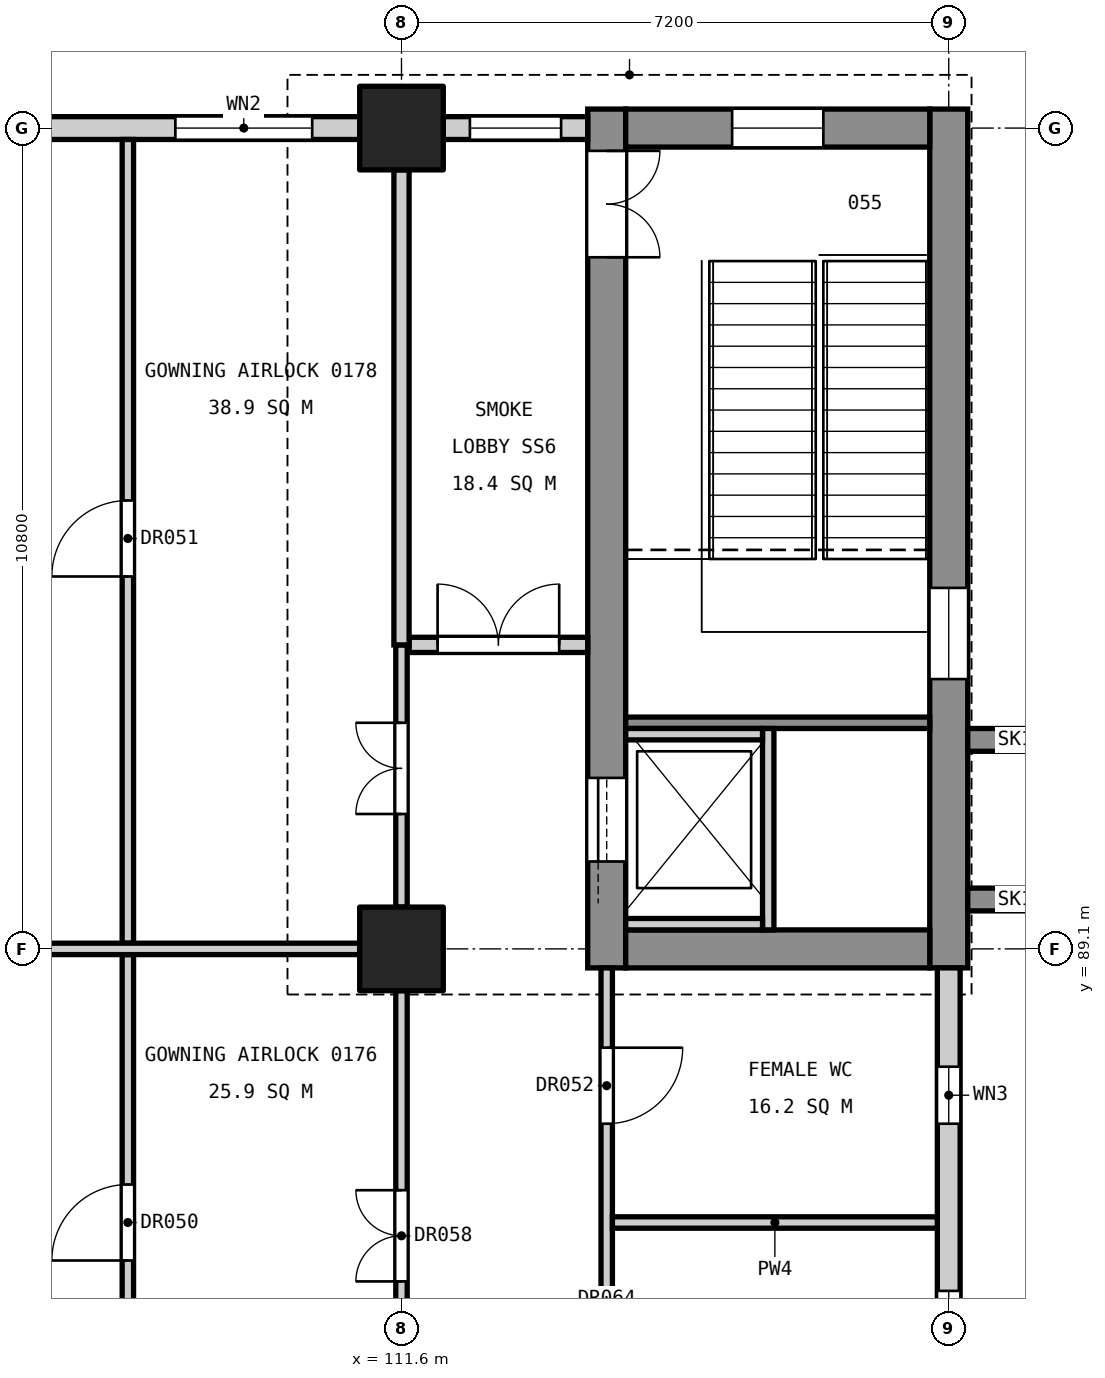
"""IFC4 building model, lengths in metres.
Left out: names, types, materials, properties, quantities, classifications, styles, units other than length and angle.
Written with IfcOpenShell. Run it as: python <this file> out.ifc"""

import sys

from ifc_helpers import new_model, si_unit, direction, frame, frame_2d, origin, origin_2d, place, context, subcontext, project, spatial, rectangle, extrude, element, fill, save


model = new_model("IFC4")
c1 = context("Model", 3, precision=1e-05, world=origin(), true_north=direction((0.0, 1.0)))
c2 = subcontext(c1, "Body", "Model", "MODEL_VIEW")
j1 = project(units=[si_unit("LENGTHUNIT", "METRE"), si_unit("PLANEANGLEUNIT", "RADIAN")], contexts=[c1])
p1 = place(None, origin())
s1 = spatial("IfcSite", under=j1, at=p1, CompositionType="ELEMENT")
p2 = place(p1, origin())
s2 = spatial("IfcBuilding", under=s1, at=p2, CompositionType="ELEMENT")
p3 = place(p2, frame((0.0, 0.0, 6.0)))
s3 = spatial("IfcBuildingStorey", under=s2, at=p3, CompositionType="ELEMENT", Elevation=6.0)
for number, where, z_axis, x_axis in (
    (1, (111.6, 89.1, 0.0), (0.0, 0.0, 1.0), (1.0, 0.0, 0.0)),
    (2, (111.6, 99.9, 0.0), (0.0, 0.0, 1.0), (1.0, 0.0, 0.0)),
):
    element("IfcColumn", number, at=place(p3, frame(where, z_axis=z_axis, x_axis=x_axis)), inside=s3, PredefinedType="COLUMN", context=c2, shape_type="SweptSolid", body=[
        extrude(rectangle(XDim=1.1, YDim=1.1, at=origin_2d()), origin(), (0.0, 0.0, 1.0), 5.4),
    ])
p4 = place(p3, frame((118.8, 88.85, 0.0), z_axis=(0.0, 0.0, 1.0), x_axis=(0.0, 1.0, 0.0)))
e3 = element("IfcWall", 3, at=p4, inside=s3, PredefinedType="SHEAR", context=c2, shape_type="SweptSolid", body=[
    extrude(rectangle(XDim=11.3, YDim=0.5, at=frame_2d((5.65, 0.0))), origin(), (0.0, 0.0, 1.0), 5.1),
])
p5 = place(p4, frame((3.8, 0.0, 3.4)))
e4 = element("IfcOpeningElement", 4, at=p5, cuts=e3, PredefinedType="OPENING", context=c2, shape_type="SweptSolid", body=[
    extrude(rectangle(XDim=1.2, YDim=0.9, at=frame_2d((0.6, 0.45))), frame((0.0, 0.26, 0.0), z_axis=(0.0, -1.0, 0.0), x_axis=(1.0, 0.0, 0.0)), (0.0, 0.0, 1.0), 0.52),
])
p6 = place(p3, frame((114.3, 88.85, 0.0), z_axis=(0.0, 0.0, 1.0), x_axis=(0.0, 1.0, 0.0)))
e5 = element("IfcWall", 5, at=p6, inside=s3, PredefinedType="SHEAR", context=c2, shape_type="SweptSolid", body=[
    extrude(rectangle(XDim=11.3, YDim=0.5, at=frame_2d((5.65, 0.0))), origin(), (0.0, 0.0, 1.0), 5.1),
])
p7 = place(p6, frame((9.35, 0.0, 0.0)))
e6 = element("IfcOpeningElement", 6, at=p7, cuts=e5, PredefinedType="OPENING", context=c2, shape_type="SweptSolid", body=[
    extrude(rectangle(XDim=1.4, YDim=2.1, at=frame_2d((0.7, 1.05))), frame((0.0, 0.26, 0.0), z_axis=(0.0, -1.0, 0.0), x_axis=(1.0, 0.0, 0.0)), (0.0, 0.0, 1.0), 0.52),
])
p8 = place(p6, frame((1.4, 0.0, 0.0)))
e7 = element("IfcOpeningElement", 7, at=p8, cuts=e5, PredefinedType="OPENING", context=c2, shape_type="SweptSolid", body=[
    extrude(rectangle(XDim=1.1, YDim=2.1, at=frame_2d((0.55, 1.05))), frame((0.0, 0.26, 0.0), z_axis=(0.0, -1.0, 0.0), x_axis=(1.0, 0.0, 0.0)), (0.0, 0.0, 1.0), 0.52),
])
p9 = place(p3, frame((118.55, 89.1, 0.0), z_axis=(0.0, 0.0, 1.0), x_axis=(-1.0, 0.0, 0.0)))
e8 = element("IfcWall", 8, at=p9, inside=s3, PredefinedType="SHEAR", context=c2, shape_type="SweptSolid", body=[
    extrude(rectangle(XDim=4.0, YDim=0.5, at=frame_2d((2.0, 0.0))), origin(), (0.0, 0.0, 1.0), 5.1),
])
p10 = place(p3, frame((118.55, 99.9, 0.0), z_axis=(0.0, 0.0, 1.0), x_axis=(-1.0, 0.0, 0.0)))
e9 = element("IfcWall", 9, at=p10, inside=s3, PredefinedType="SHEAR", context=c2, shape_type="SweptSolid", body=[
    extrude(rectangle(XDim=4.0, YDim=0.5, at=frame_2d((2.0, 0.0))), origin(), (0.0, 0.0, 1.0), 5.1),
])
p11 = place(p10, frame((1.4, 0.0, 3.4)))
e10 = element("IfcOpeningElement", 10, at=p11, cuts=e9, PredefinedType="OPENING", context=c2, shape_type="SweptSolid", body=[
    extrude(rectangle(XDim=1.2, YDim=0.9, at=frame_2d((0.6, 0.45))), frame((0.0, 0.26, 0.0), z_axis=(0.0, -1.0, 0.0), x_axis=(1.0, 0.0, 0.0)), (0.0, 0.0, 1.0), 0.52),
])
for number, where, z_axis, x_axis in (
    (11, (119.05, 89.75, 0.0), (0.0, 0.0, 1.0), (1.0, 0.0, 0.0)),
    (12, (119.05, 91.85, 0.0), (0.0, 0.0, 1.0), (1.0, 0.0, 0.0)),
):
    element("IfcWall", number, at=place(p3, frame(where, z_axis=z_axis, x_axis=x_axis)), inside=s3, PredefinedType="SHEAR", context=c2, shape_type="SweptSolid", body=[
        extrude(rectangle(XDim=1.25, YDim=0.3, at=frame_2d((0.625, 0.0))), origin(), (0.0, 0.0, 1.0), 5.4),
    ])
p12 = place(p3, frame((118.55, 92.075, 0.0), z_axis=(0.0, 0.0, 1.0), x_axis=(-1.0, 0.0, 0.0)))
e13 = element("IfcWall", 13, at=p12, inside=s3, PredefinedType="SOLIDWALL", context=c2, shape_type="SweptSolid", body=[
    extrude(rectangle(XDim=4.0, YDim=0.15, at=frame_2d((2.0, 0.0))), origin(), (0.0, 0.0, 1.0), 5.1),
])
p13 = place(p3, frame((116.425, 92.0, 0.0), z_axis=(0.0, 0.0, 1.0), x_axis=(0.0, -1.0, 0.0)))
e14 = element("IfcWall", 14, at=p13, inside=s3, PredefinedType="SOLIDWALL", context=c2, shape_type="SweptSolid", body=[
    extrude(rectangle(XDim=2.65, YDim=0.15, at=frame_2d((1.325, 0.0))), origin(), (0.0, 0.0, 1.0), 5.4),
])
for number, where, z_axis, x_axis in (
    (15, (116.35, 91.925, 0.0), (0.0, 0.0, 1.0), (-1.0, 0.0, 0.0)),
    (16, (116.35, 89.425, 0.0), (0.0, 0.0, 1.0), (-1.0, 0.0, 0.0)),
):
    element("IfcWall", number, at=place(p3, frame(where, z_axis=z_axis, x_axis=x_axis)), inside=s3, PredefinedType="SOLIDWALL", context=c2, shape_type="SweptSolid", body=[
        extrude(rectangle(XDim=1.8, YDim=0.15, at=frame_2d((0.9, 0.0))), origin(), (0.0, 0.0, 1.0), 5.4),
    ])
p14 = place(p3, frame((118.8, 78.85, 0.0), z_axis=(0.0, 0.0, 1.0), x_axis=(0.0, 1.0, 0.0)))
e17 = element("IfcWall", 17, at=p14, inside=s3, PredefinedType="STANDARD", context=c2, shape_type="SweptSolid", body=[
    extrude(rectangle(XDim=10.0, YDim=0.3, at=frame_2d((5.0, 0.0))), origin(), (0.0, 0.0, 1.0), 4.1),
])
p15 = place(p14, frame((0.625, 0.0, 0.9)))
e18 = element("IfcOpeningElement", 18, at=p15, cuts=e17, PredefinedType="OPENING", context=c2, shape_type="SweptSolid", body=[
    extrude(rectangle(XDim=1.8, YDim=3.0, at=frame_2d((0.9, 1.5))), frame((0.0, 0.16, 0.0), z_axis=(0.0, -1.0, 0.0), x_axis=(1.0, 0.0, 0.0)), (0.0, 0.0, 1.0), 0.32),
])
p16 = place(p14, frame((3.95, 0.0, 0.9)))
e19 = element("IfcOpeningElement", 19, at=p16, cuts=e17, PredefinedType="OPENING", context=c2, shape_type="SweptSolid", body=[
    extrude(rectangle(XDim=1.8, YDim=3.0, at=frame_2d((0.9, 1.5))), frame((0.0, 0.16, 0.0), z_axis=(0.0, -1.0, 0.0), x_axis=(1.0, 0.0, 0.0)), (0.0, 0.0, 1.0), 0.32),
])
p17 = place(p14, frame((7.95, 0.0, 0.8)))
e20 = element("IfcOpeningElement", 20, at=p17, cuts=e17, PredefinedType="OPENING", context=c2, shape_type="SweptSolid", body=[
    extrude(rectangle(XDim=0.75, YDim=1.2, at=frame_2d((0.375, 0.6))), frame((0.0, 0.16, 0.0), z_axis=(0.0, -1.0, 0.0), x_axis=(1.0, 0.0, 0.0)), (0.0, 0.0, 1.0), 0.32),
])
p18 = place(p3, frame((114.05, 99.9, 0.0), z_axis=(0.0, 0.0, 1.0), x_axis=(-1.0, 0.0, 0.0)))
e21 = element("IfcWall", 21, at=p18, inside=s3, PredefinedType="STANDARD", context=c2, shape_type="SweptSolid", body=[
    extrude(rectangle(XDim=1.9, YDim=0.3, at=frame_2d((0.95, 0.0))), origin(), (0.0, 0.0, 1.0), 4.3),
])
p19 = place(p18, frame((0.35, 0.0, 0.9)))
e22 = element("IfcOpeningElement", 22, at=p19, cuts=e21, PredefinedType="OPENING", context=c2, shape_type="SweptSolid", body=[
    extrude(rectangle(XDim=1.2, YDim=2.4, at=frame_2d((0.6, 1.2))), frame((0.0, 0.16, 0.0), z_axis=(0.0, -1.0, 0.0), x_axis=(1.0, 0.0, 0.0)), (0.0, 0.0, 1.0), 0.32),
])
p20 = place(p3, frame((111.05, 99.9, 0.0), z_axis=(0.0, 0.0, 1.0), x_axis=(-1.0, 0.0, 0.0)))
e23 = element("IfcWall", 23, at=p20, inside=s3, PredefinedType="STANDARD", context=c2, shape_type="SweptSolid", body=[
    extrude(rectangle(XDim=9.7, YDim=0.3, at=frame_2d((4.85, 0.0))), origin(), (0.0, 0.0, 1.0), 4.3),
])
p21 = place(p20, frame((0.625, 0.0, 0.9)))
e24 = element("IfcOpeningElement", 24, at=p21, cuts=e23, PredefinedType="OPENING", context=c2, shape_type="SweptSolid", body=[
    extrude(rectangle(XDim=1.8, YDim=3.0, at=frame_2d((0.9, 1.5))), frame((0.0, 0.16, 0.0), z_axis=(0.0, -1.0, 0.0), x_axis=(1.0, 0.0, 0.0)), (0.0, 0.0, 1.0), 0.32),
])
p22 = place(p20, frame((4.475, 0.0, 0.8)))
e25 = element("IfcOpeningElement", 25, at=p22, cuts=e23, PredefinedType="OPENING", context=c2, shape_type="SweptSolid", body=[
    extrude(rectangle(XDim=0.75, YDim=1.2, at=frame_2d((0.375, 0.6))), frame((0.0, 0.16, 0.0), z_axis=(0.0, -1.0, 0.0), x_axis=(1.0, 0.0, 0.0)), (0.0, 0.0, 1.0), 0.32),
])
p23 = place(p20, frame((7.275, 0.0, 0.9)))
e26 = element("IfcOpeningElement", 26, at=p23, cuts=e23, PredefinedType="OPENING", context=c2, shape_type="SweptSolid", body=[
    extrude(rectangle(XDim=1.8, YDim=3.0, at=frame_2d((0.9, 1.5))), frame((0.0, 0.16, 0.0), z_axis=(0.0, -1.0, 0.0), x_axis=(1.0, 0.0, 0.0)), (0.0, 0.0, 1.0), 0.32),
])
p24 = place(p3, frame((114.3, 78.45, 0.0), z_axis=(0.0, 0.0, 1.0), x_axis=(0.0, 1.0, 0.0)))
e27 = element("IfcWall", 27, at=p24, inside=s3, PredefinedType="PARTITIONING", context=c2, shape_type="SweptSolid", body=[
    extrude(rectangle(XDim=10.4, YDim=0.15, at=frame_2d((5.2, 0.0))), origin(), (0.0, 0.0, 1.0), 4.0),
])
p25 = place(p24, frame((8.35, 0.0, 0.0)))
e28 = element("IfcOpeningElement", 28, at=p25, cuts=e27, PredefinedType="OPENING", context=c2, shape_type="SweptSolid", body=[
    extrude(rectangle(XDim=1.0, YDim=2.1, at=frame_2d((0.5, 1.05))), frame((0.0, 0.085, 0.0), z_axis=(0.0, -1.0, 0.0), x_axis=(1.0, 0.0, 0.0)), (0.0, 0.0, 1.0), 0.17),
])
p26 = place(p24, frame((1.15, 0.0, 0.0)))
e29 = element("IfcOpeningElement", 29, at=p26, cuts=e27, PredefinedType="OPENING", context=c2, shape_type="SweptSolid", body=[
    extrude(rectangle(XDim=1.0, YDim=2.1, at=frame_2d((0.5, 1.05))), frame((0.0, 0.085, 0.0), z_axis=(0.0, -1.0, 0.0), x_axis=(1.0, 0.0, 0.0)), (0.0, 0.0, 1.0), 0.17),
])
p27 = place(p24, frame((4.75, 0.0, 0.0)))
e30 = element("IfcOpeningElement", 30, at=p27, cuts=e27, PredefinedType="OPENING", context=c2, shape_type="SweptSolid", body=[
    extrude(rectangle(XDim=1.0, YDim=2.1, at=frame_2d((0.5, 1.05))), frame((0.0, 0.085, 0.0), z_axis=(0.0, -1.0, 0.0), x_axis=(1.0, 0.0, 0.0)), (0.0, 0.0, 1.0), 0.17),
])
p28 = place(p3, frame((118.65, 85.5, 0.0), z_axis=(0.0, 0.0, 1.0), x_axis=(-1.0, 0.0, 0.0)))
e31 = element("IfcWall", 31, at=p28, inside=s3, PredefinedType="PARTITIONING", context=c2, shape_type="SweptSolid", body=[
    extrude(rectangle(XDim=4.275, YDim=0.15, at=frame_2d((2.137, 0.0))), origin(), (0.0, 0.0, 1.0), 4.3),
])
p29 = place(p3, frame((114.05, 93.1, 0.0), z_axis=(0.0, 0.0, 1.0), x_axis=(-1.0, 0.0, 0.0)))
e32 = element("IfcWall", 32, at=p29, inside=s3, PredefinedType="PARTITIONING", context=c2, shape_type="SweptSolid", body=[
    extrude(rectangle(XDim=2.35, YDim=0.2, at=frame_2d((1.175, 0.0))), origin(), (0.0, 0.0, 1.0), 4.0),
])
p30 = place(p29, frame((0.375, 0.0, 0.0)))
e33 = element("IfcOpeningElement", 33, at=p30, cuts=e32, PredefinedType="OPENING", context=c2, shape_type="SweptSolid", body=[
    extrude(rectangle(XDim=1.6, YDim=2.1, at=frame_2d((0.8, 1.05))), frame((0.0, 0.11, 0.0), z_axis=(0.0, -1.0, 0.0), x_axis=(1.0, 0.0, 0.0)), (0.0, 0.0, 1.0), 0.22),
])
p31 = place(p3, frame((111.6, 78.85, 0.0), z_axis=(0.0, 0.0, 1.0), x_axis=(0.0, 1.0, 0.0)))
e34 = element("IfcWall", 34, at=p31, inside=s3, PredefinedType="PARTITIONING", context=c2, shape_type="SweptSolid", body=[
    extrude(rectangle(XDim=9.7, YDim=0.15, at=frame_2d((4.85, 0.0))), origin(), (0.0, 0.0, 1.0), 4.0),
])
p32 = place(p31, frame((1.025, 0.0, 0.0)))
e35 = element("IfcOpeningElement", 35, at=p32, cuts=e34, PredefinedType="OPENING", context=c2, shape_type="SweptSolid", body=[
    extrude(rectangle(XDim=1.2, YDim=2.1, at=frame_2d((0.6, 1.05))), frame((0.0, 0.085, 0.0), z_axis=(0.0, -1.0, 0.0), x_axis=(1.0, 0.0, 0.0)), (0.0, 0.0, 1.0), 0.17),
])
p33 = place(p31, frame((5.875, 0.0, 0.0)))
e36 = element("IfcOpeningElement", 36, at=p33, cuts=e34, PredefinedType="OPENING", context=c2, shape_type="SweptSolid", body=[
    extrude(rectangle(XDim=1.2, YDim=2.1, at=frame_2d((0.6, 1.05))), frame((0.0, 0.085, 0.0), z_axis=(0.0, -1.0, 0.0), x_axis=(1.0, 0.0, 0.0)), (0.0, 0.0, 1.0), 0.17),
])
p34 = place(p3, frame((111.6, 89.65, 0.0), z_axis=(0.0, 0.0, 1.0), x_axis=(0.0, 1.0, 0.0)))
e37 = element("IfcWall", 37, at=p34, inside=s3, PredefinedType="PARTITIONING", context=c2, shape_type="SweptSolid", body=[
    extrude(rectangle(XDim=3.45, YDim=0.15, at=frame_2d((1.725, 0.0))), origin(), (0.0, 0.0, 1.0), 4.0),
])
p35 = place(p34, frame((1.225, 0.0, 0.0)))
e38 = element("IfcOpeningElement", 38, at=p35, cuts=e37, PredefinedType="OPENING", context=c2, shape_type="SweptSolid", body=[
    extrude(rectangle(XDim=1.2, YDim=2.1, at=frame_2d((0.6, 1.05))), frame((0.0, 0.085, 0.0), z_axis=(0.0, -1.0, 0.0), x_axis=(1.0, 0.0, 0.0)), (0.0, 0.0, 1.0), 0.17),
])
p36 = place(p3, frame((111.6, 93.1, 0.0), z_axis=(0.0, 0.0, 1.0), x_axis=(0.0, 1.0, 0.0)))
e39 = element("IfcWall", 39, at=p36, inside=s3, PredefinedType="PARTITIONING", context=c2, shape_type="SweptSolid", body=[
    extrude(rectangle(XDim=6.25, YDim=0.2, at=frame_2d((3.125, 0.0))), origin(), (0.0, 0.0, 1.0), 4.0),
])
p37 = place(p3, frame((108.0, 81.975, 0.0), z_axis=(0.0, 0.0, 1.0), x_axis=(0.0, 1.0, 0.0)))
e40 = element("IfcWall", 40, at=p37, inside=s3, PredefinedType="PARTITIONING", context=c2, shape_type="SweptSolid", body=[
    extrude(rectangle(XDim=7.05, YDim=0.15, at=frame_2d((3.525, 0.0))), origin(), (0.0, 0.0, 1.0), 4.0),
])
p38 = place(p37, frame((3.025, 0.0, 0.0)))
e41 = element("IfcOpeningElement", 41, at=p38, cuts=e40, PredefinedType="OPENING", context=c2, shape_type="SweptSolid", body=[
    extrude(rectangle(XDim=1.0, YDim=2.1, at=frame_2d((0.5, 1.05))), frame((0.0, 0.085, 0.0), z_axis=(0.0, -1.0, 0.0), x_axis=(1.0, 0.0, 0.0)), (0.0, 0.0, 1.0), 0.17),
])
p39 = place(p3, frame((108.0, 89.175, 0.0), z_axis=(0.0, 0.0, 1.0), x_axis=(0.0, 1.0, 0.0)))
e42 = element("IfcWall", 42, at=p39, inside=s3, PredefinedType="PARTITIONING", context=c2, shape_type="SweptSolid", body=[
    extrude(rectangle(XDim=10.575, YDim=0.15, at=frame_2d((5.288, 0.0))), origin(), (0.0, 0.0, 1.0), 4.0),
])
p40 = place(p39, frame((4.825, 0.0, 0.0)))
e43 = element("IfcOpeningElement", 43, at=p40, cuts=e42, PredefinedType="OPENING", context=c2, shape_type="SweptSolid", body=[
    extrude(rectangle(XDim=1.0, YDim=2.1, at=frame_2d((0.5, 1.05))), frame((0.0, 0.085, 0.0), z_axis=(0.0, -1.0, 0.0), x_axis=(1.0, 0.0, 0.0)), (0.0, 0.0, 1.0), 0.17),
])
p41 = place(p3, frame((111.05, 89.1, 0.0), z_axis=(0.0, 0.0, 1.0), x_axis=(-1.0, 0.0, 0.0)))
e44 = element("IfcWall", 44, at=p41, inside=s3, PredefinedType="PARTITIONING", context=c2, shape_type="SweptSolid", body=[
    extrude(rectangle(XDim=9.7, YDim=0.15, at=frame_2d((4.85, 0.0))), origin(), (0.0, 0.0, 1.0), 4.3),
])
p42 = place(p7, frame((1.4, 0.0, 0.0), z_axis=(0.0, 0.0, 1.0), x_axis=(-1.0, 0.0, 0.0)))
e45 = element("IfcDoor", 45, at=p42, inside=s3, OperationType="DOUBLE_DOOR_SINGLE_SWING", PredefinedType="DOOR", context=c2, shape_type="SweptSolid", body=[
    extrude(rectangle(XDim=1.4, YDim=2.1, at=frame_2d((0.7, 1.05))), frame((0.0, 0.025, 0.0), z_axis=(0.0, -1.0, 0.0), x_axis=(1.0, 0.0, 0.0)), (0.0, 0.0, 1.0), 0.05),
])
fill(e6, e45)
p43 = place(p8, origin())
e46 = element("IfcDoor", 46, at=p43, inside=s3, OperationType="SLIDING_TO_LEFT", PredefinedType="DOOR", context=c2, shape_type="SweptSolid", body=[
    extrude(rectangle(XDim=1.1, YDim=2.1, at=frame_2d((0.55, 1.05))), frame((0.0, 0.025, 0.0), z_axis=(0.0, -1.0, 0.0), x_axis=(1.0, 0.0, 0.0)), (0.0, 0.0, 1.0), 0.05),
])
fill(e7, e46)
p44 = place(p16, origin())
e47 = element("IfcWindow", 47, at=p44, inside=s3, PartitioningType="SINGLE_PANEL", PredefinedType="WINDOW", context=c2, shape_type="SweptSolid", body=[
    extrude(rectangle(XDim=1.8, YDim=3.0, at=frame_2d((0.9, 1.5))), frame((0.0, 0.03, 0.0), z_axis=(0.0, -1.0, 0.0), x_axis=(1.0, 0.0, 0.0)), (0.0, 0.0, 1.0), 0.06),
])
fill(e19, e47)
p45 = place(p17, origin())
e48 = element("IfcWindow", 48, at=p45, inside=s3, PartitioningType="SINGLE_PANEL", PredefinedType="WINDOW", context=c2, shape_type="SweptSolid", body=[
    extrude(rectangle(XDim=0.75, YDim=1.2, at=frame_2d((0.375, 0.6))), frame((0.0, 0.03, 0.0), z_axis=(0.0, -1.0, 0.0), x_axis=(1.0, 0.0, 0.0)), (0.0, 0.0, 1.0), 0.06),
])
fill(e20, e48)
p46 = place(p19, origin())
e49 = element("IfcWindow", 49, at=p46, inside=s3, PartitioningType="SINGLE_PANEL", PredefinedType="WINDOW", context=c2, shape_type="SweptSolid", body=[
    extrude(rectangle(XDim=1.2, YDim=2.4, at=frame_2d((0.6, 1.2))), frame((0.0, 0.03, 0.0), z_axis=(0.0, -1.0, 0.0), x_axis=(1.0, 0.0, 0.0)), (0.0, 0.0, 1.0), 0.06),
])
fill(e22, e49)
p47 = place(p21, origin())
e50 = element("IfcWindow", 50, at=p47, inside=s3, PartitioningType="SINGLE_PANEL", PredefinedType="WINDOW", context=c2, shape_type="SweptSolid", body=[
    extrude(rectangle(XDim=1.8, YDim=3.0, at=frame_2d((0.9, 1.5))), frame((0.0, 0.03, 0.0), z_axis=(0.0, -1.0, 0.0), x_axis=(1.0, 0.0, 0.0)), (0.0, 0.0, 1.0), 0.06),
])
fill(e24, e50)
p48 = place(p5, origin())
e51 = element("IfcWindow", 51, at=p48, inside=s3, PartitioningType="SINGLE_PANEL", PredefinedType="WINDOW", context=c2, shape_type="SweptSolid", body=[
    extrude(rectangle(XDim=1.2, YDim=0.9, at=frame_2d((0.6, 0.45))), frame((0.0, 0.03, 0.0), z_axis=(0.0, -1.0, 0.0), x_axis=(1.0, 0.0, 0.0)), (0.0, 0.0, 1.0), 0.06),
])
fill(e4, e51)
p49 = place(p11, origin())
e52 = element("IfcWindow", 52, at=p49, inside=s3, PartitioningType="SINGLE_PANEL", PredefinedType="WINDOW", context=c2, shape_type="SweptSolid", body=[
    extrude(rectangle(XDim=1.2, YDim=0.9, at=frame_2d((0.6, 0.45))), frame((0.0, 0.03, 0.0), z_axis=(0.0, -1.0, 0.0), x_axis=(1.0, 0.0, 0.0)), (0.0, 0.0, 1.0), 0.06),
])
fill(e10, e52)
p50 = place(p38, origin())
e53 = element("IfcDoor", 53, at=p50, inside=s3, OperationType="SINGLE_SWING_LEFT", PredefinedType="DOOR", context=c2, shape_type="SweptSolid", body=[
    extrude(rectangle(XDim=1.0, YDim=2.1, at=frame_2d((0.5, 1.05))), frame((0.0, 0.025, 0.0), z_axis=(0.0, -1.0, 0.0), x_axis=(1.0, 0.0, 0.0)), (0.0, 0.0, 1.0), 0.05),
])
fill(e41, e53)
p51 = place(p40, origin())
e54 = element("IfcDoor", 54, at=p51, inside=s3, OperationType="SINGLE_SWING_LEFT", PredefinedType="DOOR", context=c2, shape_type="SweptSolid", body=[
    extrude(rectangle(XDim=1.0, YDim=2.1, at=frame_2d((0.5, 1.05))), frame((0.0, 0.025, 0.0), z_axis=(0.0, -1.0, 0.0), x_axis=(1.0, 0.0, 0.0)), (0.0, 0.0, 1.0), 0.05),
])
fill(e43, e54)
p52 = place(p25, frame((1.0, 0.0, 0.0), z_axis=(0.0, 0.0, 1.0), x_axis=(-1.0, 0.0, 0.0)))
e55 = element("IfcDoor", 55, at=p52, inside=s3, OperationType="SINGLE_SWING_LEFT", PredefinedType="DOOR", context=c2, shape_type="SweptSolid", body=[
    extrude(rectangle(XDim=1.0, YDim=2.1, at=frame_2d((0.5, 1.05))), frame((0.0, 0.025, 0.0), z_axis=(0.0, -1.0, 0.0), x_axis=(1.0, 0.0, 0.0)), (0.0, 0.0, 1.0), 0.05),
])
fill(e28, e55)
p53 = place(p33, origin())
e56 = element("IfcDoor", 56, at=p53, inside=s3, OperationType="DOUBLE_DOOR_SINGLE_SWING", PredefinedType="DOOR", context=c2, shape_type="SweptSolid", body=[
    extrude(rectangle(XDim=1.2, YDim=2.1, at=frame_2d((0.6, 1.05))), frame((0.0, 0.025, 0.0), z_axis=(0.0, -1.0, 0.0), x_axis=(1.0, 0.0, 0.0)), (0.0, 0.0, 1.0), 0.05),
])
fill(e36, e56)
p54 = place(p35, origin())
e57 = element("IfcDoor", 57, at=p54, inside=s3, OperationType="DOUBLE_DOOR_SINGLE_SWING", PredefinedType="DOOR", context=c2, shape_type="SweptSolid", body=[
    extrude(rectangle(XDim=1.2, YDim=2.1, at=frame_2d((0.6, 1.05))), frame((0.0, 0.025, 0.0), z_axis=(0.0, -1.0, 0.0), x_axis=(1.0, 0.0, 0.0)), (0.0, 0.0, 1.0), 0.05),
])
fill(e38, e57)
p55 = place(p30, frame((1.6, 0.0, 0.0), z_axis=(0.0, 0.0, 1.0), x_axis=(-1.0, 0.0, 0.0)))
e58 = element("IfcDoor", 58, at=p55, inside=s3, OperationType="DOUBLE_DOOR_SINGLE_SWING", PredefinedType="DOOR", context=c2, shape_type="SweptSolid", body=[
    extrude(rectangle(XDim=1.6, YDim=2.1, at=frame_2d((0.8, 1.05))), frame((0.0, 0.025, 0.0), z_axis=(0.0, -1.0, 0.0), x_axis=(1.0, 0.0, 0.0)), (0.0, 0.0, 1.0), 0.05),
])
fill(e33, e58)
save(model, sys.argv[1])
